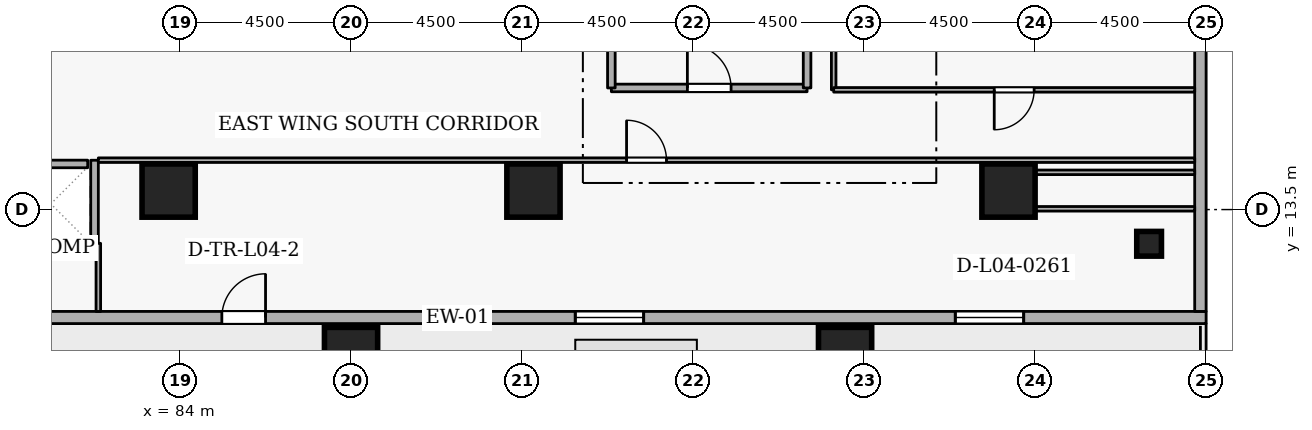
"""IFC4 building model, lengths in metres.
Left out: names, types, materials, properties, quantities, classifications, styles, units other than length and angle.
Written with IfcOpenShell. Run it as: python <this file> out.ifc"""

import sys

from ifc_helpers import new_model, si_unit, direction, frame, frame_2d, origin, origin_2d, place, context, subcontext, project, spatial, rectangle, extrude, element, fill, save


model = new_model("IFC4")
c1 = context("Model", 3, precision=1e-05, world=origin(), true_north=direction((0.0, 1.0)))
c2 = subcontext(c1, "Body", "Model", "MODEL_VIEW")
j1 = project(units=[si_unit("LENGTHUNIT", "METRE"), si_unit("PLANEANGLEUNIT", "RADIAN")], contexts=[c1])
p1 = place(None, origin())
s1 = spatial("IfcSite", under=j1, at=p1, CompositionType="ELEMENT")
p2 = place(p1, origin())
s2 = spatial("IfcBuilding", under=s1, at=p2, CompositionType="ELEMENT")
p3 = place(p2, frame((0.0, 0.0, 18.6)))
s3 = spatial("IfcBuildingStorey", under=s2, at=p3, CompositionType="ELEMENT", Elevation=18.6)
for number, where, z_axis, x_axis in (
    (1, (105.8, 14.0, 0.0), (0.0, 0.0, 1.0), (1.0, 0.0, 0.0)),
    (2, (101.5, 9.7, 0.0), (0.0, 0.0, 1.0), (1.0, 0.0, 0.0)),
    (3, (88.5, 9.7, 0.0), (0.0, 0.0, 1.0), (1.0, 0.0, 0.0)),
    (4, (93.3, 14.0, 0.0), (0.0, 0.0, 1.0), (1.0, 0.0, 0.0)),
    (5, (83.7, 14.0, 0.0), (0.0, 0.0, 1.0), (1.0, 0.0, 0.0)),
):
    element("IfcColumn", number, at=place(p3, frame(where, z_axis=z_axis, x_axis=x_axis)), inside=s3, PredefinedType="COLUMN", context=c2, shape_type="SweptSolid", body=[
        extrude(rectangle(XDim=1.4, YDim=1.4, at=origin_2d()), origin(), (0.0, 0.0, 1.0), 4.5),
    ])
p4 = place(p3, frame((109.5, 12.6, 0.0), z_axis=(0.0, 0.0, 1.0), x_axis=(1.0, 0.0, 0.0)))
e6 = element("IfcColumn", 6, at=p4, inside=s3, PredefinedType="COLUMN", context=c2, shape_type="SweptSolid", body=[
    extrude(rectangle(XDim=0.65, YDim=0.65, at=origin_2d()), origin(), (0.0, 0.0, 1.0), 4.5),
])
p5 = place(p3, frame((71.6, 10.66, 0.0), z_axis=(0.0, 0.0, 1.0), x_axis=(1.0, 0.0, 0.0)))
e7 = element("IfcWall", 7, at=p5, inside=s3, PredefinedType="STANDARD", context=c2, shape_type="SweptSolid", body=[
    extrude(rectangle(XDim=39.4, YDim=0.32, at=frame_2d((19.7, 0.0))), origin(), (0.0, 0.0, 1.0), 3.56),
])
p6 = place(p5, frame((13.5, 0.0, 0.0)))
e8 = element("IfcOpeningElement", 8, at=p6, cuts=e7, PredefinedType="OPENING", context=c2, shape_type="SweptSolid", body=[
    extrude(rectangle(XDim=1.15, YDim=2.1, at=frame_2d((0.575, 1.05))), frame((0.0, 0.17, 0.0), z_axis=(0.0, -1.0, 0.0), x_axis=(1.0, 0.0, 0.0)), (0.0, 0.0, 1.0), 0.34),
])
p7 = place(p5, frame((22.8, 0.0, 0.78)))
e9 = element("IfcOpeningElement", 9, at=p7, cuts=e7, PredefinedType="OPENING", context=c2, shape_type="SweptSolid", body=[
    extrude(rectangle(XDim=1.8, YDim=2.15, at=frame_2d((0.9, 1.075))), frame((0.0, 0.17, 0.0), z_axis=(0.0, -1.0, 0.0), x_axis=(1.0, 0.0, 0.0)), (0.0, 0.0, 1.0), 0.34),
])
p8 = place(p5, frame((32.8, 0.0, 0.78)))
e10 = element("IfcOpeningElement", 10, at=p8, cuts=e7, PredefinedType="OPENING", context=c2, shape_type="SweptSolid", body=[
    extrude(rectangle(XDim=1.8, YDim=2.15, at=frame_2d((0.9, 1.075))), frame((0.0, 0.17, 0.0), z_axis=(0.0, -1.0, 0.0), x_axis=(1.0, 0.0, 0.0)), (0.0, 0.0, 1.0), 0.34),
])
p9 = place(p3, frame((110.85, 10.82, 0.0), z_axis=(0.0, 0.0, 1.0), x_axis=(0.0, 1.0, 0.0)))
e11 = element("IfcWall", 11, at=p9, inside=s3, PredefinedType="STANDARD", context=c2, shape_type="SweptSolid", body=[
    extrude(rectangle(XDim=38.36, YDim=0.3, at=frame_2d((19.18, 0.0))), origin(), (0.0, 0.0, 1.0), 3.56),
])
p10 = place(p3, frame((79.63, 14.7, 0.0), z_axis=(0.0, 0.0, 1.0), x_axis=(1.0, 0.0, 0.0)))
e12 = element("IfcWall", 12, at=p10, inside=s3, PredefinedType="STANDARD", context=c2, shape_type="SweptSolid", body=[
    extrude(rectangle(XDim=1.94, YDim=0.2, at=frame_2d((0.97, 0.0))), origin(), (0.0, 0.0, 1.0), 4.16),
])
p11 = place(p3, frame((79.452, 12.5, 0.0), z_axis=(0.0, 0.0, 1.0), x_axis=(1.0, 0.0, 0.0)))
e13 = element("IfcWall", 13, at=p11, inside=s3, PredefinedType="STANDARD", context=c2, shape_type="SweptSolid", body=[
    extrude(rectangle(XDim=2.296, YDim=0.2, at=frame_2d((1.148, 0.0))), origin(), (0.0, 0.0, 1.0), 4.16),
])
p12 = place(p3, frame((81.75, 12.612, 0.0), z_axis=(0.0, 0.0, 1.0), x_axis=(0.0, 1.0, 0.0)))
e14 = element("IfcWall", 14, at=p12, inside=s3, PredefinedType="STANDARD", context=c2, shape_type="SweptSolid", body=[
    extrude(rectangle(XDim=2.186, YDim=0.2, at=frame_2d((1.093, 0.0))), origin(), (0.0, 0.0, 1.0), 4.16),
])
p13 = place(p3, frame((95.35, 16.7, 0.0), z_axis=(0.0, 0.0, 1.0), x_axis=(1.0, 0.0, 0.0)))
e15 = element("IfcWall", 15, at=p13, inside=s3, PredefinedType="STANDARD", context=c2, shape_type="SweptSolid", body=[
    extrude(rectangle(XDim=5.15, YDim=0.2, at=frame_2d((2.575, 0.0))), origin(), (0.0, 0.0, 1.0), 4.16),
])
p14 = place(p13, frame((2.0, 0.0, 0.0)))
e16 = element("IfcOpeningElement", 16, at=p14, cuts=e15, PredefinedType="OPENING", context=c2, shape_type="SweptSolid", body=[
    extrude(rectangle(XDim=1.15, YDim=2.1, at=frame_2d((0.575, 1.05))), frame((0.0, 0.11, 0.0), z_axis=(0.0, -1.0, 0.0), x_axis=(1.0, 0.0, 0.0)), (0.0, 0.0, 1.0), 0.22),
])
for number, where, z_axis, x_axis in (
    (17, (100.5, 16.7, 0.0), (0.0, 0.0, 1.0), (0.0, 1.0, 0.0)),
    (18, (95.35, 19.2, 0.0), (0.0, 0.0, 1.0), (0.0, -1.0, 0.0)),
):
    element("IfcWall", number, at=place(p3, frame(where, z_axis=z_axis, x_axis=x_axis)), inside=s3, PredefinedType="STANDARD", context=c2, shape_type="SweptSolid", body=[
        extrude(rectangle(XDim=2.5, YDim=0.2, at=frame_2d((1.25, 0.0))), origin(), (0.0, 0.0, 1.0), 4.16),
    ])
p15 = place(p3, frame((101.2, 16.65, 0.0), z_axis=(0.0, 0.0, 1.0), x_axis=(0.0, 1.0, 0.0)))
e19 = element("IfcWall", 19, at=p15, inside=s3, PredefinedType="PARTITIONING", context=c2, shape_type="SweptSolid", body=[
    extrude(rectangle(XDim=10.35, YDim=0.12, at=frame_2d((5.175, 0.0))), origin(), (0.0, 0.0, 1.0), 4.16),
])
p16 = place(p3, frame((110.7, 16.65, 0.0), z_axis=(0.0, 0.0, 1.0), x_axis=(-1.0, 0.0, 0.0)))
e20 = element("IfcWall", 20, at=p16, inside=s3, PredefinedType="PARTITIONING", context=c2, shape_type="SweptSolid", body=[
    extrude(rectangle(XDim=9.5, YDim=0.12, at=frame_2d((4.75, 0.0))), origin(), (0.0, 0.0, 1.0), 4.16),
])
p17 = place(p16, frame((4.225, 0.0, 0.0)))
e21 = element("IfcOpeningElement", 21, at=p17, cuts=e20, PredefinedType="OPENING", context=c2, shape_type="SweptSolid", body=[
    extrude(rectangle(XDim=1.05, YDim=2.1, at=frame_2d((0.525, 1.05))), frame((0.0, 0.07, 0.0), z_axis=(0.0, -1.0, 0.0), x_axis=(1.0, 0.0, 0.0)), (0.0, 0.0, 1.0), 0.14),
])
p18 = place(p3, frame((81.85, 10.82, 0.0), z_axis=(0.0, 0.0, 1.0), x_axis=(0.0, 1.0, 0.0)))
e22 = element("IfcWall", 22, at=p18, inside=s3, PredefinedType="PARTITIONING", context=c2, shape_type="SweptSolid", body=[
    extrude(rectangle(XDim=1.792, YDim=0.12, at=frame_2d((0.896, 0.0))), origin(), (0.0, 0.0, 1.0), 4.16),
])
p19 = place(p3, frame((81.85, 14.8, 0.0), z_axis=(0.0, 0.0, 1.0), x_axis=(1.0, 0.0, 0.0)))
e23 = element("IfcWall", 23, at=p19, inside=s3, PredefinedType="PARTITIONING", context=c2, shape_type="SweptSolid", body=[
    extrude(rectangle(XDim=28.85, YDim=0.12, at=frame_2d((14.425, 0.0))), origin(), (0.0, 0.0, 1.0), 4.16),
])
p20 = place(p19, frame((13.9, 0.0, 0.0)))
e24 = element("IfcOpeningElement", 24, at=p20, cuts=e23, PredefinedType="OPENING", context=c2, shape_type="SweptSolid", body=[
    extrude(rectangle(XDim=1.05, YDim=2.1, at=frame_2d((0.525, 1.05))), frame((0.0, 0.07, 0.0), z_axis=(0.0, -1.0, 0.0), x_axis=(1.0, 0.0, 0.0)), (0.0, 0.0, 1.0), 0.14),
])
for number, where, z_axis, x_axis in (
    (25, (110.7, 14.48, 0.0), (0.0, 0.0, 1.0), (-1.0, 0.0, 0.0)),
    (26, (105.8, 13.52, 0.0), (0.0, 0.0, 1.0), (1.0, 0.0, 0.0)),
):
    element("IfcWall", number, at=place(p3, frame(where, z_axis=z_axis, x_axis=x_axis)), inside=s3, PredefinedType="PARTITIONING", context=c2, shape_type="SweptSolid", body=[
        extrude(rectangle(XDim=4.9, YDim=0.12, at=frame_2d((2.45, 0.0))), origin(), (0.0, 0.0, 1.0), 4.16),
    ])
p21 = place(p6, origin())
e27 = element("IfcDoor", 27, at=p21, inside=s3, OperationType="SINGLE_SWING_RIGHT", PredefinedType="DOOR", context=c2, shape_type="SweptSolid", body=[
    extrude(rectangle(XDim=1.15, YDim=2.1, at=frame_2d((0.575, 1.05))), frame((0.0, 0.025, 0.0), z_axis=(0.0, -1.0, 0.0), x_axis=(1.0, 0.0, 0.0)), (0.0, 0.0, 1.0), 0.05),
])
fill(e8, e27)
p22 = place(p7, origin())
e28 = element("IfcWindow", 28, at=p22, inside=s3, PartitioningType="SINGLE_PANEL", PredefinedType="WINDOW", context=c2, shape_type="SweptSolid", body=[
    extrude(rectangle(XDim=1.8, YDim=2.15, at=frame_2d((0.9, 1.075))), frame((0.0, 0.03, 0.0), z_axis=(0.0, -1.0, 0.0), x_axis=(1.0, 0.0, 0.0)), (0.0, 0.0, 1.0), 0.06),
])
fill(e9, e28)
p23 = place(p8, origin())
e29 = element("IfcWindow", 29, at=p23, inside=s3, PartitioningType="SINGLE_PANEL", PredefinedType="WINDOW", context=c2, shape_type="SweptSolid", body=[
    extrude(rectangle(XDim=1.8, YDim=2.15, at=frame_2d((0.9, 1.075))), frame((0.0, 0.03, 0.0), z_axis=(0.0, -1.0, 0.0), x_axis=(1.0, 0.0, 0.0)), (0.0, 0.0, 1.0), 0.06),
])
fill(e10, e29)
p24 = place(p14, origin())
e30 = element("IfcDoor", 30, at=p24, inside=s3, OperationType="SINGLE_SWING_LEFT", PredefinedType="DOOR", context=c2, shape_type="SweptSolid", body=[
    extrude(rectangle(XDim=1.15, YDim=2.1, at=frame_2d((0.575, 1.05))), frame((0.0, 0.025, 0.0), z_axis=(0.0, -1.0, 0.0), x_axis=(1.0, 0.0, 0.0)), (0.0, 0.0, 1.0), 0.05),
])
fill(e16, e30)
p25 = place(p17, origin())
e31 = element("IfcDoor", 31, at=p25, inside=s3, OperationType="SINGLE_SWING_RIGHT", PredefinedType="DOOR", context=c2, shape_type="SweptSolid", body=[
    extrude(rectangle(XDim=1.05, YDim=2.1, at=frame_2d((0.525, 1.05))), frame((0.0, 0.025, 0.0), z_axis=(0.0, -1.0, 0.0), x_axis=(1.0, 0.0, 0.0)), (0.0, 0.0, 1.0), 0.05),
])
fill(e21, e31)
p26 = place(p20, origin())
e32 = element("IfcDoor", 32, at=p26, inside=s3, OperationType="SINGLE_SWING_LEFT", PredefinedType="DOOR", context=c2, shape_type="SweptSolid", body=[
    extrude(rectangle(XDim=1.05, YDim=2.1, at=frame_2d((0.525, 1.05))), frame((0.0, 0.025, 0.0), z_axis=(0.0, -1.0, 0.0), x_axis=(1.0, 0.0, 0.0)), (0.0, 0.0, 1.0), 0.05),
])
fill(e24, e32)
save(model, sys.argv[1])
